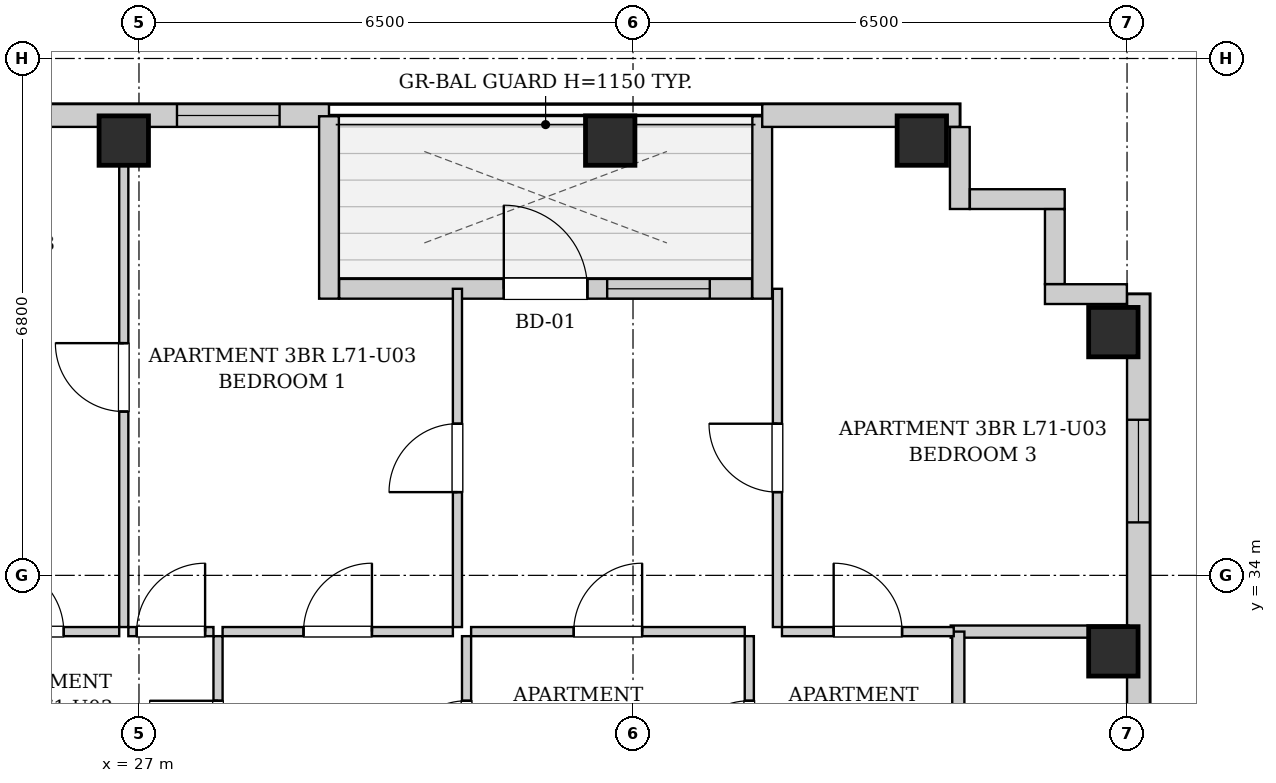
"""IFC4 building model, lengths in metres.
Left out: names, types, materials, properties, quantities, classifications, styles, units other than length and angle.
Written with IfcOpenShell. Run it as: python <this file> out.ifc"""

import sys

from ifc_helpers import new_model, si_unit, direction, frame, frame_2d, origin, origin_2d, place, context, subcontext, project, spatial, rectangle, extrude, element, fill, save


model = new_model("IFC4")
c1 = context("Model", 3, precision=1e-05, world=origin(), true_north=direction((0.0, 1.0)))
c2 = subcontext(c1, "Body", "Model", "MODEL_VIEW")
j1 = project(units=[si_unit("LENGTHUNIT", "METRE"), si_unit("PLANEANGLEUNIT", "RADIAN")], contexts=[c1])
p1 = place(None, origin())
s1 = spatial("IfcSite", under=j1, at=p1, CompositionType="ELEMENT")
p2 = place(p1, origin())
s2 = spatial("IfcBuilding", under=s1, at=p2, CompositionType="ELEMENT")
p3 = place(p2, frame((0.0, 0.0, 244.5)))
s3 = spatial("IfcBuildingStorey", under=s2, at=p3, CompositionType="ELEMENT", Elevation=244.5)
for number, where, z_axis, x_axis in (
    (1, (26.8, 39.72, 0.0), (0.0, 0.0, 1.0), (1.0, 0.0, 0.0)),
    (2, (33.2, 39.72, 0.0), (0.0, 0.0, 1.0), (1.0, 0.0, 0.0)),
    (3, (37.3, 39.72, 0.0), (0.0, 0.0, 1.0), (1.0, 0.0, 0.0)),
    (4, (39.82, 33.0, 0.0), (0.0, 0.0, 1.0), (1.0, 0.0, 0.0)),
    (5, (39.82, 37.2, 0.0), (0.0, 0.0, 1.0), (1.0, 0.0, 0.0)),
):
    element("IfcColumn", number, at=place(p3, frame(where, z_axis=z_axis, x_axis=x_axis)), inside=s3, PredefinedType="COLUMN", context=c2, shape_type="SweptSolid", body=[
        extrude(rectangle(XDim=0.65, YDim=0.65, at=origin_2d()), origin(), (0.0, 0.0, 1.0), 3.4),
    ])
p4 = place(p3, frame((13.1, 40.05, 0.0), z_axis=(0.0, 0.0, 1.0), x_axis=(1.0, 0.0, 0.0)))
e6 = element("IfcWall", 6, at=p4, inside=s3, PredefinedType="SOLIDWALL", context=c2, shape_type="SweptSolid", body=[
    extrude(rectangle(XDim=16.4, YDim=0.3, at=frame_2d((8.2, 0.0))), origin(), (0.0, 0.0, 1.0), 3.14),
])
p5 = place(p4, frame((1.808, 0.0, 0.55)))
e7 = element("IfcOpeningElement", 7, at=p5, cuts=e6, PredefinedType="OPENING", context=c2, shape_type="SweptSolid", body=[
    extrude(rectangle(XDim=1.35, YDim=1.2, at=frame_2d((0.675, 0.6))), frame((0.0, 0.16, 0.0), z_axis=(0.0, -1.0, 0.0), x_axis=(1.0, 0.0, 0.0)), (0.0, 0.0, 1.0), 0.32),
])
p6 = place(p4, frame((6.246, 0.0, 0.55)))
e8 = element("IfcOpeningElement", 8, at=p6, cuts=e6, PredefinedType="OPENING", context=c2, shape_type="SweptSolid", body=[
    extrude(rectangle(XDim=1.35, YDim=1.2, at=frame_2d((0.675, 0.6))), frame((0.0, 0.16, 0.0), z_axis=(0.0, -1.0, 0.0), x_axis=(1.0, 0.0, 0.0)), (0.0, 0.0, 1.0), 0.32),
])
p7 = place(p4, frame((14.4, 0.0, 0.55)))
e9 = element("IfcOpeningElement", 9, at=p7, cuts=e6, PredefinedType="OPENING", context=c2, shape_type="SweptSolid", body=[
    extrude(rectangle(XDim=1.35, YDim=1.2, at=frame_2d((0.675, 0.6))), frame((0.0, 0.16, 0.0), z_axis=(0.0, -1.0, 0.0), x_axis=(1.0, 0.0, 0.0)), (0.0, 0.0, 1.0), 0.32),
])
p8 = place(p3, frame((29.5, 40.04, 0.0), z_axis=(0.0, 0.0, 1.0), x_axis=(0.0, -1.0, 0.0)))
e10 = element("IfcWall", 10, at=p8, inside=s3, PredefinedType="SOLIDWALL", context=c2, shape_type="SweptSolid", body=[
    extrude(rectangle(XDim=2.4, YDim=0.26, at=frame_2d((1.2, 0.0))), origin(), (0.0, 0.0, 1.0), 3.14),
])
p9 = place(p3, frame((29.634, 37.77, 0.0), z_axis=(0.0, 0.0, 1.0), x_axis=(1.0, 0.0, 0.0)))
e11 = element("IfcWall", 11, at=p9, inside=s3, PredefinedType="SOLIDWALL", context=c2, shape_type="SweptSolid", body=[
    extrude(rectangle(XDim=5.432, YDim=0.26, at=frame_2d((2.716, 0.0))), origin(), (0.0, 0.0, 1.0), 3.14),
])
p10 = place(p9, frame((2.166, 0.0, 0.0)))
e12 = element("IfcOpeningElement", 12, at=p10, cuts=e11, PredefinedType="OPENING", context=c2, shape_type="SweptSolid", body=[
    extrude(rectangle(XDim=1.1, YDim=2.0, at=frame_2d((0.55, 1.0))), frame((0.0, 0.14, 0.0), z_axis=(0.0, -1.0, 0.0), x_axis=(1.0, 0.0, 0.0)), (0.0, 0.0, 1.0), 0.28),
])
p11 = place(p9, frame((3.526, 0.0, 0.55)))
e13 = element("IfcOpeningElement", 13, at=p11, cuts=e11, PredefinedType="OPENING", context=c2, shape_type="SweptSolid", body=[
    extrude(rectangle(XDim=1.35, YDim=1.2, at=frame_2d((0.675, 0.6))), frame((0.0, 0.14, 0.0), z_axis=(0.0, -1.0, 0.0), x_axis=(1.0, 0.0, 0.0)), (0.0, 0.0, 1.0), 0.28),
])
p12 = place(p3, frame((35.2, 37.64, 0.0), z_axis=(0.0, 0.0, 1.0), x_axis=(0.0, 1.0, 0.0)))
e14 = element("IfcWall", 14, at=p12, inside=s3, PredefinedType="SOLIDWALL", context=c2, shape_type="SweptSolid", body=[
    extrude(rectangle(XDim=2.4, YDim=0.26, at=frame_2d((1.2, 0.0))), origin(), (0.0, 0.0, 1.0), 3.14),
])
p13 = place(p3, frame((35.2, 40.05, 0.0), z_axis=(0.0, 0.0, 1.0), x_axis=(1.0, 0.0, 0.0)))
e15 = element("IfcWall", 15, at=p13, inside=s3, PredefinedType="SOLIDWALL", context=c2, shape_type="SweptSolid", body=[
    extrude(rectangle(XDim=2.6, YDim=0.3, at=frame_2d((1.3, 0.0))), origin(), (0.0, 0.0, 1.0), 3.14),
])
p14 = place(p3, frame((40.15, 37.7, 0.0), z_axis=(0.0, 0.0, 1.0), x_axis=(0.0, -1.0, 0.0)))
e16 = element("IfcWall", 16, at=p14, inside=s3, PredefinedType="SOLIDWALL", context=c2, shape_type="SweptSolid", body=[
    extrude(rectangle(XDim=31.4, YDim=0.3, at=frame_2d((15.7, 0.0))), origin(), (0.0, 0.0, 1.0), 3.14),
])
p15 = place(p14, frame((28.396, 0.0, 0.55)))
e17 = element("IfcOpeningElement", 17, at=p15, cuts=e16, PredefinedType="OPENING", context=c2, shape_type="SweptSolid", body=[
    extrude(rectangle(XDim=1.35, YDim=1.2, at=frame_2d((0.675, 0.6))), frame((0.0, 0.16, 0.0), z_axis=(0.0, -1.0, 0.0), x_axis=(1.0, 0.0, 0.0)), (0.0, 0.0, 1.0), 0.32),
])
p16 = place(p14, frame((1.653, 0.0, 0.55)))
e18 = element("IfcOpeningElement", 18, at=p16, cuts=e16, PredefinedType="OPENING", context=c2, shape_type="SweptSolid", body=[
    extrude(rectangle(XDim=1.35, YDim=1.2, at=frame_2d((0.675, 0.6))), frame((0.0, 0.16, 0.0), z_axis=(0.0, -1.0, 0.0), x_axis=(1.0, 0.0, 0.0)), (0.0, 0.0, 1.0), 0.32),
])
p17 = place(p14, frame((19.683, 0.0, 0.55)))
e19 = element("IfcOpeningElement", 19, at=p17, cuts=e16, PredefinedType="OPENING", context=c2, shape_type="SweptSolid", body=[
    extrude(rectangle(XDim=1.35, YDim=1.2, at=frame_2d((0.675, 0.6))), frame((0.0, 0.16, 0.0), z_axis=(0.0, -1.0, 0.0), x_axis=(1.0, 0.0, 0.0)), (0.0, 0.0, 1.0), 0.32),
])
p18 = place(p14, frame((10.367, 0.0, 0.55)))
e20 = element("IfcOpeningElement", 20, at=p18, cuts=e16, PredefinedType="OPENING", context=c2, shape_type="SweptSolid", body=[
    extrude(rectangle(XDim=1.35, YDim=1.2, at=frame_2d((0.675, 0.6))), frame((0.0, 0.16, 0.0), z_axis=(0.0, -1.0, 0.0), x_axis=(1.0, 0.0, 0.0)), (0.0, 0.0, 1.0), 0.32),
])
p19 = place(p3, frame((37.8, 39.898, 0.0), z_axis=(0.0, 0.0, 1.0), x_axis=(0.0, -1.0, 0.0)))
e21 = element("IfcWall", 21, at=p19, inside=s3, PredefinedType="SOLIDWALL", context=c2, shape_type="SweptSolid", body=[
    extrude(rectangle(XDim=1.078, YDim=0.26, at=frame_2d((0.539, 0.0))), origin(), (0.0, 0.0, 1.0), 3.14),
])
p20 = place(p3, frame((37.932, 38.95, 0.0), z_axis=(0.0, 0.0, 1.0), x_axis=(1.0, 0.0, 0.0)))
e22 = element("IfcWall", 22, at=p20, inside=s3, PredefinedType="SOLIDWALL", context=c2, shape_type="SweptSolid", body=[
    extrude(rectangle(XDim=1.248, YDim=0.26, at=frame_2d((0.624, 0.0))), origin(), (0.0, 0.0, 1.0), 3.14),
])
p21 = place(p3, frame((39.05, 38.818, 0.0), z_axis=(0.0, 0.0, 1.0), x_axis=(0.0, -1.0, 0.0)))
e23 = element("IfcWall", 23, at=p21, inside=s3, PredefinedType="SOLIDWALL", context=c2, shape_type="SweptSolid", body=[
    extrude(rectangle(XDim=0.986, YDim=0.26, at=frame_2d((0.493, 0.0))), origin(), (0.0, 0.0, 1.0), 3.14),
])
p22 = place(p3, frame((38.92, 37.7, 0.0), z_axis=(0.0, 0.0, 1.0), x_axis=(1.0, 0.0, 0.0)))
e24 = element("IfcWall", 24, at=p22, inside=s3, PredefinedType="SOLIDWALL", context=c2, shape_type="SweptSolid", body=[
    extrude(rectangle(XDim=1.078, YDim=0.26, at=frame_2d((0.539, 0.0))), origin(), (0.0, 0.0, 1.0), 3.14),
])
p23 = place(p3, frame((37.68, 33.26, 0.0), z_axis=(0.0, 0.0, 1.0), x_axis=(1.0, 0.0, 0.0)))
e25 = element("IfcWall", 25, at=p23, inside=s3, PredefinedType="PARTITIONING", context=c2, shape_type="SweptSolid", body=[
    extrude(rectangle(XDim=2.34, YDim=0.16, at=frame_2d((1.17, 0.0))), origin(), (0.0, 0.0, 1.0), 3.14),
])
p24 = place(p3, frame((37.78, 30.6, 0.0), z_axis=(0.0, 0.0, 1.0), x_axis=(0.0, 1.0, 0.0)))
e26 = element("IfcWall", 26, at=p24, inside=s3, PredefinedType="PARTITIONING", context=c2, shape_type="SweptSolid", body=[
    extrude(rectangle(XDim=2.66, YDim=0.16, at=frame_2d((1.33, 0.0))), origin(), (0.0, 0.0, 1.0), 3.14),
])
p25 = place(p3, frame((28.04, 30.6, 0.0), z_axis=(0.0, 0.0, 1.0), x_axis=(0.0, 1.0, 0.0)))
e27 = element("IfcWall", 27, at=p25, inside=s3, PredefinedType="PARTITIONING", context=c2, shape_type="SweptSolid", body=[
    extrude(rectangle(XDim=2.6, YDim=0.12, at=frame_2d((1.3, 0.0))), origin(), (0.0, 0.0, 1.0), 3.14),
])
p26 = place(p25, frame((0.85, 0.0, 0.0)))
e28 = element("IfcOpeningElement", 28, at=p26, cuts=e27, PredefinedType="OPENING", context=c2, shape_type="SweptSolid", body=[
    extrude(rectangle(XDim=0.9, YDim=2.05, at=frame_2d((0.45, 1.025))), frame((0.0, 0.07, 0.0), z_axis=(0.0, -1.0, 0.0), x_axis=(1.0, 0.0, 0.0)), (0.0, 0.0, 1.0), 0.14),
])
p27 = place(p3, frame((24.38, 33.26, 0.0), z_axis=(0.0, 0.0, 1.0), x_axis=(1.0, 0.0, 0.0)))
e29 = element("IfcWall", 29, at=p27, inside=s3, PredefinedType="PARTITIONING", context=c2, shape_type="SweptSolid", body=[
    extrude(rectangle(XDim=2.36, YDim=0.12, at=frame_2d((1.18, 0.0))), origin(), (0.0, 0.0, 1.0), 3.14),
])
p28 = place(p27, frame((0.73, 0.0, 0.0)))
e30 = element("IfcOpeningElement", 30, at=p28, cuts=e29, PredefinedType="OPENING", context=c2, shape_type="SweptSolid", body=[
    extrude(rectangle(XDim=0.9, YDim=2.05, at=frame_2d((0.45, 1.025))), frame((0.0, 0.07, 0.0), z_axis=(0.0, -1.0, 0.0), x_axis=(1.0, 0.0, 0.0)), (0.0, 0.0, 1.0), 0.14),
])
p29 = place(p3, frame((26.86, 33.26, 0.0), z_axis=(0.0, 0.0, 1.0), x_axis=(1.0, 0.0, 0.0)))
e31 = element("IfcWall", 31, at=p29, inside=s3, PredefinedType="PARTITIONING", context=c2, shape_type="SweptSolid", body=[
    extrude(rectangle(XDim=1.12, YDim=0.12, at=frame_2d((0.56, 0.0))), origin(), (0.0, 0.0, 1.0), 3.14),
])
p30 = place(p29, frame((0.11, 0.0, 0.0)))
e32 = element("IfcOpeningElement", 32, at=p30, cuts=e31, PredefinedType="OPENING", context=c2, shape_type="SweptSolid", body=[
    extrude(rectangle(XDim=0.9, YDim=2.05, at=frame_2d((0.45, 1.025))), frame((0.0, 0.07, 0.0), z_axis=(0.0, -1.0, 0.0), x_axis=(1.0, 0.0, 0.0)), (0.0, 0.0, 1.0), 0.14),
])
p31 = place(p3, frame((31.31, 30.6, 0.0), z_axis=(0.0, 0.0, 1.0), x_axis=(0.0, 1.0, 0.0)))
e33 = element("IfcWall", 33, at=p31, inside=s3, PredefinedType="PARTITIONING", context=c2, shape_type="SweptSolid", body=[
    extrude(rectangle(XDim=2.6, YDim=0.12, at=frame_2d((1.3, 0.0))), origin(), (0.0, 0.0, 1.0), 3.14),
])
p32 = place(p31, frame((0.85, 0.0, 0.0)))
e34 = element("IfcOpeningElement", 34, at=p32, cuts=e33, PredefinedType="OPENING", context=c2, shape_type="SweptSolid", body=[
    extrude(rectangle(XDim=0.9, YDim=2.05, at=frame_2d((0.45, 1.025))), frame((0.0, 0.07, 0.0), z_axis=(0.0, -1.0, 0.0), x_axis=(1.0, 0.0, 0.0)), (0.0, 0.0, 1.0), 0.14),
])
p33 = place(p3, frame((28.1, 33.26, 0.0), z_axis=(0.0, 0.0, 1.0), x_axis=(1.0, 0.0, 0.0)))
e35 = element("IfcWall", 35, at=p33, inside=s3, PredefinedType="PARTITIONING", context=c2, shape_type="SweptSolid", body=[
    extrude(rectangle(XDim=3.03, YDim=0.12, at=frame_2d((1.515, 0.0))), origin(), (0.0, 0.0, 1.0), 3.14),
])
p34 = place(p33, frame((1.065, 0.0, 0.0)))
e36 = element("IfcOpeningElement", 36, at=p34, cuts=e35, PredefinedType="OPENING", context=c2, shape_type="SweptSolid", body=[
    extrude(rectangle(XDim=0.9, YDim=2.05, at=frame_2d((0.45, 1.025))), frame((0.0, 0.07, 0.0), z_axis=(0.0, -1.0, 0.0), x_axis=(1.0, 0.0, 0.0)), (0.0, 0.0, 1.0), 0.14),
])
p35 = place(p3, frame((35.03, 30.6, 0.0), z_axis=(0.0, 0.0, 1.0), x_axis=(0.0, 1.0, 0.0)))
e37 = element("IfcWall", 37, at=p35, inside=s3, PredefinedType="PARTITIONING", context=c2, shape_type="SweptSolid", body=[
    extrude(rectangle(XDim=2.6, YDim=0.12, at=frame_2d((1.3, 0.0))), origin(), (0.0, 0.0, 1.0), 3.14),
])
p36 = place(p35, frame((0.85, 0.0, 0.0)))
e38 = element("IfcOpeningElement", 38, at=p36, cuts=e37, PredefinedType="OPENING", context=c2, shape_type="SweptSolid", body=[
    extrude(rectangle(XDim=0.9, YDim=2.05, at=frame_2d((0.45, 1.025))), frame((0.0, 0.07, 0.0), z_axis=(0.0, -1.0, 0.0), x_axis=(1.0, 0.0, 0.0)), (0.0, 0.0, 1.0), 0.14),
])
p37 = place(p3, frame((31.37, 33.26, 0.0), z_axis=(0.0, 0.0, 1.0), x_axis=(1.0, 0.0, 0.0)))
e39 = element("IfcWall", 39, at=p37, inside=s3, PredefinedType="PARTITIONING", context=c2, shape_type="SweptSolid", body=[
    extrude(rectangle(XDim=3.6, YDim=0.12, at=frame_2d((1.8, 0.0))), origin(), (0.0, 0.0, 1.0), 3.14),
])
p38 = place(p37, frame((1.35, 0.0, 0.0)))
e40 = element("IfcOpeningElement", 40, at=p38, cuts=e39, PredefinedType="OPENING", context=c2, shape_type="SweptSolid", body=[
    extrude(rectangle(XDim=0.9, YDim=2.05, at=frame_2d((0.45, 1.025))), frame((0.0, 0.07, 0.0), z_axis=(0.0, -1.0, 0.0), x_axis=(1.0, 0.0, 0.0)), (0.0, 0.0, 1.0), 0.14),
])
p39 = place(p3, frame((35.46, 33.26, 0.0), z_axis=(0.0, 0.0, 1.0), x_axis=(1.0, 0.0, 0.0)))
e41 = element("IfcWall", 41, at=p39, inside=s3, PredefinedType="PARTITIONING", context=c2, shape_type="SweptSolid", body=[
    extrude(rectangle(XDim=2.26, YDim=0.12, at=frame_2d((1.13, 0.0))), origin(), (0.0, 0.0, 1.0), 3.14),
])
p40 = place(p39, frame((0.68, 0.0, 0.0)))
e42 = element("IfcOpeningElement", 42, at=p40, cuts=e41, PredefinedType="OPENING", context=c2, shape_type="SweptSolid", body=[
    extrude(rectangle(XDim=0.9, YDim=2.05, at=frame_2d((0.45, 1.025))), frame((0.0, 0.07, 0.0), z_axis=(0.0, -1.0, 0.0), x_axis=(1.0, 0.0, 0.0)), (0.0, 0.0, 1.0), 0.14),
])
p41 = place(p3, frame((26.8, 33.32, 0.0), z_axis=(0.0, 0.0, 1.0), x_axis=(0.0, 1.0, 0.0)))
e43 = element("IfcWall", 43, at=p41, inside=s3, PredefinedType="PARTITIONING", context=c2, shape_type="SweptSolid", body=[
    extrude(rectangle(XDim=6.6, YDim=0.12, at=frame_2d((3.3, 0.0))), origin(), (0.0, 0.0, 1.0), 3.14),
])
p42 = place(p41, frame((2.835, 0.0, 0.0)))
e44 = element("IfcOpeningElement", 44, at=p42, cuts=e43, PredefinedType="OPENING", context=c2, shape_type="SweptSolid", body=[
    extrude(rectangle(XDim=0.9, YDim=2.05, at=frame_2d((0.45, 1.025))), frame((0.0, 0.07, 0.0), z_axis=(0.0, -1.0, 0.0), x_axis=(1.0, 0.0, 0.0)), (0.0, 0.0, 1.0), 0.14),
])
p43 = place(p3, frame((31.19, 33.32, 0.0), z_axis=(0.0, 0.0, 1.0), x_axis=(0.0, 1.0, 0.0)))
e45 = element("IfcWall", 45, at=p43, inside=s3, PredefinedType="PARTITIONING", context=c2, shape_type="SweptSolid", body=[
    extrude(rectangle(XDim=4.45, YDim=0.12, at=frame_2d((2.225, 0.0))), origin(), (0.0, 0.0, 1.0), 3.14),
])
p44 = place(p43, frame((1.775, 0.0, 0.0)))
e46 = element("IfcOpeningElement", 46, at=p44, cuts=e45, PredefinedType="OPENING", context=c2, shape_type="SweptSolid", body=[
    extrude(rectangle(XDim=0.9, YDim=2.05, at=frame_2d((0.45, 1.025))), frame((0.0, 0.07, 0.0), z_axis=(0.0, -1.0, 0.0), x_axis=(1.0, 0.0, 0.0)), (0.0, 0.0, 1.0), 0.14),
])
p45 = place(p3, frame((35.4, 33.32, 0.0), z_axis=(0.0, 0.0, 1.0), x_axis=(0.0, 1.0, 0.0)))
e47 = element("IfcWall", 47, at=p45, inside=s3, PredefinedType="PARTITIONING", context=c2, shape_type="SweptSolid", body=[
    extrude(rectangle(XDim=4.45, YDim=0.12, at=frame_2d((2.225, 0.0))), origin(), (0.0, 0.0, 1.0), 3.14),
])
p46 = place(p45, frame((1.775, 0.0, 0.0)))
e48 = element("IfcOpeningElement", 48, at=p46, cuts=e47, PredefinedType="OPENING", context=c2, shape_type="SweptSolid", body=[
    extrude(rectangle(XDim=0.9, YDim=2.05, at=frame_2d((0.45, 1.025))), frame((0.0, 0.07, 0.0), z_axis=(0.0, -1.0, 0.0), x_axis=(1.0, 0.0, 0.0)), (0.0, 0.0, 1.0), 0.14),
])
p47 = place(p26, origin())
e49 = element("IfcDoor", 49, at=p47, inside=s3, OperationType="SINGLE_SWING_RIGHT", PredefinedType="DOOR", context=c2, shape_type="SweptSolid", body=[
    extrude(rectangle(XDim=0.9, YDim=2.05, at=frame_2d((0.45, 1.025))), frame((0.0, 0.025, 0.0), z_axis=(0.0, -1.0, 0.0), x_axis=(1.0, 0.0, 0.0)), (0.0, 0.0, 1.0), 0.05),
])
fill(e28, e49)
p48 = place(p28, origin())
e50 = element("IfcDoor", 50, at=p48, inside=s3, OperationType="SINGLE_SWING_LEFT", PredefinedType="DOOR", context=c2, shape_type="SweptSolid", body=[
    extrude(rectangle(XDim=0.9, YDim=2.05, at=frame_2d((0.45, 1.025))), frame((0.0, 0.025, 0.0), z_axis=(0.0, -1.0, 0.0), x_axis=(1.0, 0.0, 0.0)), (0.0, 0.0, 1.0), 0.05),
])
fill(e30, e50)
p49 = place(p30, origin())
e51 = element("IfcDoor", 51, at=p49, inside=s3, OperationType="SINGLE_SWING_RIGHT", PredefinedType="DOOR", context=c2, shape_type="SweptSolid", body=[
    extrude(rectangle(XDim=0.9, YDim=2.05, at=frame_2d((0.45, 1.025))), frame((0.0, 0.025, 0.0), z_axis=(0.0, -1.0, 0.0), x_axis=(1.0, 0.0, 0.0)), (0.0, 0.0, 1.0), 0.05),
])
fill(e32, e51)
p50 = place(p32, origin())
e52 = element("IfcDoor", 52, at=p50, inside=s3, OperationType="SINGLE_SWING_LEFT", PredefinedType="DOOR", context=c2, shape_type="SweptSolid", body=[
    extrude(rectangle(XDim=0.9, YDim=2.05, at=frame_2d((0.45, 1.025))), frame((0.0, 0.025, 0.0), z_axis=(0.0, -1.0, 0.0), x_axis=(1.0, 0.0, 0.0)), (0.0, 0.0, 1.0), 0.05),
])
fill(e34, e52)
p51 = place(p34, origin())
e53 = element("IfcDoor", 53, at=p51, inside=s3, OperationType="SINGLE_SWING_RIGHT", PredefinedType="DOOR", context=c2, shape_type="SweptSolid", body=[
    extrude(rectangle(XDim=0.9, YDim=2.05, at=frame_2d((0.45, 1.025))), frame((0.0, 0.025, 0.0), z_axis=(0.0, -1.0, 0.0), x_axis=(1.0, 0.0, 0.0)), (0.0, 0.0, 1.0), 0.05),
])
fill(e36, e53)
p52 = place(p36, origin())
e54 = element("IfcDoor", 54, at=p52, inside=s3, OperationType="SINGLE_SWING_LEFT", PredefinedType="DOOR", context=c2, shape_type="SweptSolid", body=[
    extrude(rectangle(XDim=0.9, YDim=2.05, at=frame_2d((0.45, 1.025))), frame((0.0, 0.025, 0.0), z_axis=(0.0, -1.0, 0.0), x_axis=(1.0, 0.0, 0.0)), (0.0, 0.0, 1.0), 0.05),
])
fill(e38, e54)
p53 = place(p38, origin())
e55 = element("IfcDoor", 55, at=p53, inside=s3, OperationType="SINGLE_SWING_RIGHT", PredefinedType="DOOR", context=c2, shape_type="SweptSolid", body=[
    extrude(rectangle(XDim=0.9, YDim=2.05, at=frame_2d((0.45, 1.025))), frame((0.0, 0.025, 0.0), z_axis=(0.0, -1.0, 0.0), x_axis=(1.0, 0.0, 0.0)), (0.0, 0.0, 1.0), 0.05),
])
fill(e40, e55)
p54 = place(p40, origin())
e56 = element("IfcDoor", 56, at=p54, inside=s3, OperationType="SINGLE_SWING_LEFT", PredefinedType="DOOR", context=c2, shape_type="SweptSolid", body=[
    extrude(rectangle(XDim=0.9, YDim=2.05, at=frame_2d((0.45, 1.025))), frame((0.0, 0.025, 0.0), z_axis=(0.0, -1.0, 0.0), x_axis=(1.0, 0.0, 0.0)), (0.0, 0.0, 1.0), 0.05),
])
fill(e42, e56)
p55 = place(p42, origin())
e57 = element("IfcDoor", 57, at=p55, inside=s3, OperationType="SINGLE_SWING_RIGHT", PredefinedType="DOOR", context=c2, shape_type="SweptSolid", body=[
    extrude(rectangle(XDim=0.9, YDim=2.05, at=frame_2d((0.45, 1.025))), frame((0.0, 0.025, 0.0), z_axis=(0.0, -1.0, 0.0), x_axis=(1.0, 0.0, 0.0)), (0.0, 0.0, 1.0), 0.05),
])
fill(e44, e57)
p56 = place(p44, origin())
e58 = element("IfcDoor", 58, at=p56, inside=s3, OperationType="SINGLE_SWING_LEFT", PredefinedType="DOOR", context=c2, shape_type="SweptSolid", body=[
    extrude(rectangle(XDim=0.9, YDim=2.05, at=frame_2d((0.45, 1.025))), frame((0.0, 0.025, 0.0), z_axis=(0.0, -1.0, 0.0), x_axis=(1.0, 0.0, 0.0)), (0.0, 0.0, 1.0), 0.05),
])
fill(e46, e58)
p57 = place(p46, origin())
e59 = element("IfcDoor", 59, at=p57, inside=s3, OperationType="SINGLE_SWING_RIGHT", PredefinedType="DOOR", context=c2, shape_type="SweptSolid", body=[
    extrude(rectangle(XDim=0.9, YDim=2.05, at=frame_2d((0.45, 1.025))), frame((0.0, 0.025, 0.0), z_axis=(0.0, -1.0, 0.0), x_axis=(1.0, 0.0, 0.0)), (0.0, 0.0, 1.0), 0.05),
])
fill(e48, e59)
p58 = place(p10, origin())
e60 = element("IfcDoor", 60, at=p58, inside=s3, OperationType="SINGLE_SWING_LEFT", PredefinedType="DOOR", context=c2, shape_type="SweptSolid", body=[
    extrude(rectangle(XDim=1.1, YDim=2.0, at=frame_2d((0.55, 1.0))), frame((0.0, 0.025, 0.0), z_axis=(0.0, -1.0, 0.0), x_axis=(1.0, 0.0, 0.0)), (0.0, 0.0, 1.0), 0.05),
])
fill(e12, e60)
p59 = place(p7, origin())
e61 = element("IfcWindow", 61, at=p59, inside=s3, PartitioningType="SINGLE_PANEL", PredefinedType="WINDOW", context=c2, shape_type="SweptSolid", body=[
    extrude(rectangle(XDim=1.35, YDim=1.2, at=frame_2d((0.675, 0.6))), frame((0.0, 0.03, 0.0), z_axis=(0.0, -1.0, 0.0), x_axis=(1.0, 0.0, 0.0)), (0.0, 0.0, 1.0), 0.06),
])
fill(e9, e61)
p60 = place(p11, origin())
e62 = element("IfcWindow", 62, at=p60, inside=s3, PartitioningType="SINGLE_PANEL", PredefinedType="WINDOW", context=c2, shape_type="SweptSolid", body=[
    extrude(rectangle(XDim=1.35, YDim=1.2, at=frame_2d((0.675, 0.6))), frame((0.0, 0.03, 0.0), z_axis=(0.0, -1.0, 0.0), x_axis=(1.0, 0.0, 0.0)), (0.0, 0.0, 1.0), 0.06),
])
fill(e13, e62)
p61 = place(p16, origin())
e63 = element("IfcWindow", 63, at=p61, inside=s3, PartitioningType="SINGLE_PANEL", PredefinedType="WINDOW", context=c2, shape_type="SweptSolid", body=[
    extrude(rectangle(XDim=1.35, YDim=1.2, at=frame_2d((0.675, 0.6))), frame((0.0, 0.03, 0.0), z_axis=(0.0, -1.0, 0.0), x_axis=(1.0, 0.0, 0.0)), (0.0, 0.0, 1.0), 0.06),
])
fill(e18, e63)
save(model, sys.argv[1])
